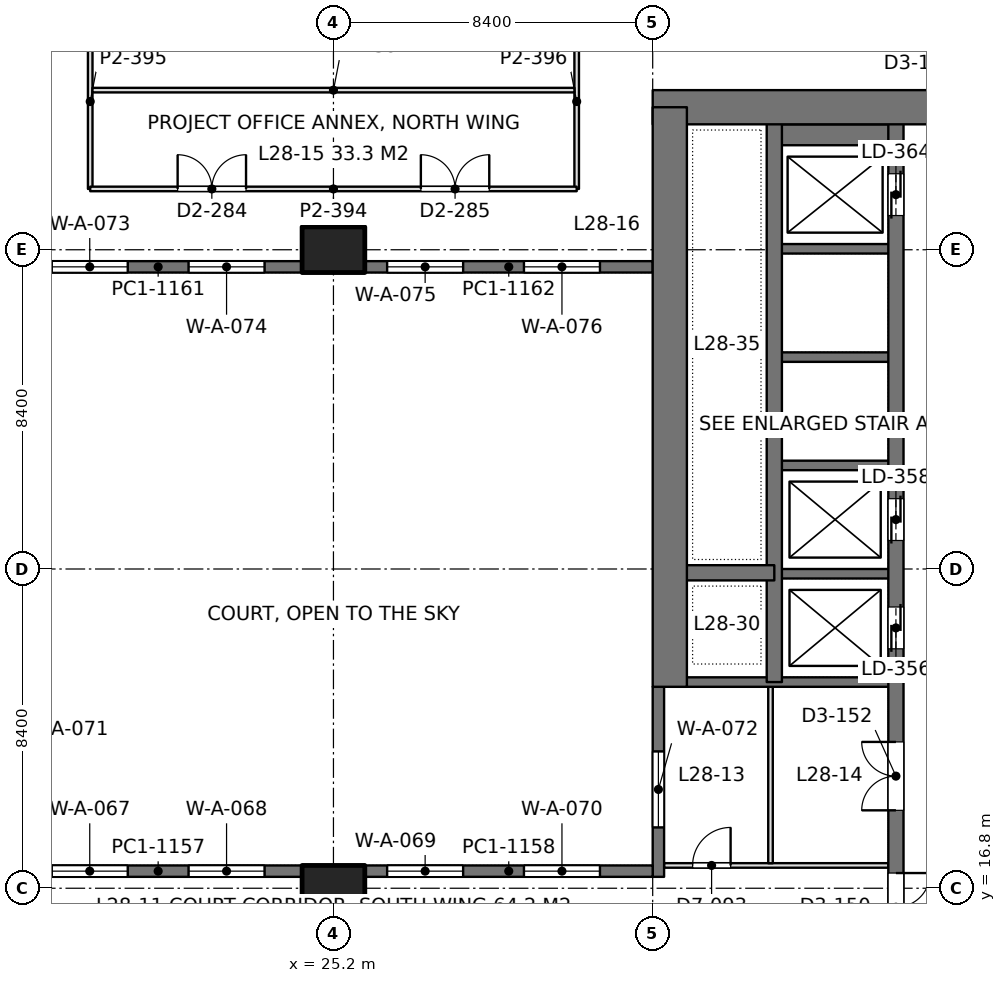
"""IFC4 building model, lengths in metres.
Left out: names, types, materials, properties, quantities, classifications, styles, units other than length and angle.
Written with IfcOpenShell. Run it as: python <this file> out.ifc"""

import sys

from ifc_helpers import new_model, si_unit, direction, frame, frame_2d, origin, origin_2d, place, context, subcontext, project, spatial, rectangle, extrude, element, fill, save


model = new_model("IFC4")
c1 = context("Model", 3, precision=1e-05, world=origin(), true_north=direction((0.0, 1.0)))
c2 = subcontext(c1, "Body", "Model", "MODEL_VIEW")
j1 = project(units=[si_unit("LENGTHUNIT", "METRE"), si_unit("PLANEANGLEUNIT", "RADIAN")], contexts=[c1])
p1 = place(None, origin())
s1 = spatial("IfcSite", under=j1, at=p1, CompositionType="ELEMENT")
p2 = place(p1, origin())
s2 = spatial("IfcBuilding", under=s1, at=p2, CompositionType="ELEMENT")
p3 = place(p2, frame((0.0, 0.0, 126.0)))
s3 = spatial("IfcBuildingStorey", under=s2, at=p3, CompositionType="ELEMENT", Elevation=126.0)
for number, where, z_axis, x_axis in (
    (1, (25.2, 16.8, 0.0), (0.0, 0.0, 1.0), (1.0, 0.0, 0.0)),
    (2, (25.2, 33.6, 0.0), (0.0, 0.0, 1.0), (1.0, 0.0, 0.0)),
):
    element("IfcColumn", number, at=place(p3, frame(where, z_axis=z_axis, x_axis=x_axis)), inside=s3, PredefinedType="COLUMN", context=c2, shape_type="SweptSolid", body=[
        extrude(rectangle(XDim=1.65, YDim=1.2, at=origin_2d()), origin(), (0.0, 0.0, 1.0), 4.2),
    ])
p4 = place(p3, frame((33.6, 37.35, 0.0), z_axis=(0.0, 0.0, 1.0), x_axis=(1.0, 0.0, 0.0)))
e3 = element("IfcWall", 3, at=p4, inside=s3, PredefinedType="SHEAR", context=c2, shape_type="SweptSolid", body=[
    extrude(rectangle(XDim=18.0, YDim=0.9, at=frame_2d((9.0, 0.0))), origin(), (0.0, 0.0, 1.0), 4.2),
])
p5 = place(p4, frame((7.25, 0.0, 0.0)))
e4 = element("IfcOpeningElement", 4, at=p5, cuts=e3, PredefinedType="OPENING", context=c2, shape_type="SweptSolid", body=[
    extrude(rectangle(XDim=1.8, YDim=2.4, at=frame_2d((0.9, 1.2))), frame((0.0, 0.46, 0.0), z_axis=(0.0, -1.0, 0.0), x_axis=(1.0, 0.0, 0.0)), (0.0, 0.0, 1.0), 0.92),
])
p6 = place(p3, frame((34.05, 22.1, 0.0), z_axis=(0.0, 0.0, 1.0), x_axis=(0.0, 1.0, 0.0)))
e5 = element("IfcWall", 5, at=p6, inside=s3, PredefinedType="SHEAR", context=c2, shape_type="SweptSolid", body=[
    extrude(rectangle(XDim=15.25, YDim=0.9, at=frame_2d((7.625, 0.0))), origin(), (0.0, 0.0, 1.0), 4.2),
])
p7 = place(p3, frame((40.0, 13.05, 0.0), z_axis=(0.0, 0.0, 1.0), x_axis=(0.0, 1.0, 0.0)))
e6 = element("IfcWall", 6, at=p7, inside=s3, PredefinedType="SHEAR", context=c2, shape_type="SweptSolid", body=[
    extrude(rectangle(XDim=24.3, YDim=0.4, at=frame_2d((12.15, 0.0))), origin(), (0.0, 0.0, 1.0), 4.2),
])
p8 = place(p7, frame((10.05, 0.0, 0.0)))
e7 = element("IfcOpeningElement", 7, at=p8, cuts=e6, PredefinedType="OPENING", context=c2, shape_type="SweptSolid", body=[
    extrude(rectangle(XDim=1.1, YDim=2.2, at=frame_2d((0.55, 1.1))), frame((0.0, 0.21, 0.0), z_axis=(0.0, -1.0, 0.0), x_axis=(1.0, 0.0, 0.0)), (0.0, 0.0, 1.0), 0.42),
])
p9 = place(p7, frame((12.9, 0.0, 0.0)))
e8 = element("IfcOpeningElement", 8, at=p9, cuts=e6, PredefinedType="OPENING", context=c2, shape_type="SweptSolid", body=[
    extrude(rectangle(XDim=1.1, YDim=2.2, at=frame_2d((0.55, 1.1))), frame((0.0, 0.21, 0.0), z_axis=(0.0, -1.0, 0.0), x_axis=(1.0, 0.0, 0.0)), (0.0, 0.0, 1.0), 0.42),
])
p10 = place(p7, frame((21.45, 0.0, 0.0)))
e9 = element("IfcOpeningElement", 9, at=p10, cuts=e6, PredefinedType="OPENING", context=c2, shape_type="SweptSolid", body=[
    extrude(rectangle(XDim=1.1, YDim=2.2, at=frame_2d((0.55, 1.1))), frame((0.0, 0.21, 0.0), z_axis=(0.0, -1.0, 0.0), x_axis=(1.0, 0.0, 0.0)), (0.0, 0.0, 1.0), 0.42),
])
p11 = place(p7, frame((2.35, 0.0, 0.0)))
e10 = element("IfcOpeningElement", 10, at=p11, cuts=e6, PredefinedType="OPENING", context=c2, shape_type="SweptSolid", body=[
    extrude(rectangle(XDim=1.8, YDim=2.4, at=frame_2d((0.9, 1.2))), frame((0.0, 0.21, 0.0), z_axis=(0.0, -1.0, 0.0), x_axis=(1.0, 0.0, 0.0)), (0.0, 0.0, 1.0), 0.42),
])
p12 = place(p7, frame((5.8, 0.0, 0.0)))
e11 = element("IfcOpeningElement", 11, at=p12, cuts=e6, PredefinedType="OPENING", context=c2, shape_type="SweptSolid", body=[
    extrude(rectangle(XDim=1.8, YDim=2.4, at=frame_2d((0.9, 1.2))), frame((0.0, 0.21, 0.0), z_axis=(0.0, -1.0, 0.0), x_axis=(1.0, 0.0, 0.0)), (0.0, 0.0, 1.0), 0.42),
])
p13 = place(p3, frame((36.8, 22.225, 0.0), z_axis=(0.0, 0.0, 1.0), x_axis=(0.0, 1.0, 0.0)))
e12 = element("IfcWall", 12, at=p13, inside=s3, PredefinedType="SHEAR", context=c2, shape_type="SweptSolid", body=[
    extrude(rectangle(XDim=15.125, YDim=0.4, at=frame_2d((7.562, 0.0))), origin(), (0.0, 0.0, 1.0), 4.2),
])
p14 = place(p3, frame((36.8, 25.1, 0.0), z_axis=(0.0, 0.0, 1.0), x_axis=(-1.0, 0.0, 0.0)))
e13 = element("IfcWall", 13, at=p14, inside=s3, PredefinedType="SHEAR", context=c2, shape_type="SweptSolid", body=[
    extrude(rectangle(XDim=2.75, YDim=0.4, at=frame_2d((1.375, 0.0))), origin(), (0.0, 0.0, 1.0), 4.2),
])
p15 = place(p3, frame((40.0, 22.225, 0.0), z_axis=(0.0, 0.0, 1.0), x_axis=(-1.0, 0.0, 0.0)))
e14 = element("IfcWall", 14, at=p15, inside=s3, PredefinedType="SHEAR", context=c2, shape_type="SweptSolid", body=[
    extrude(rectangle(XDim=5.95, YDim=0.25, at=frame_2d((2.975, 0.0))), origin(), (0.0, 0.0, 1.0), 4.2),
])
for number, where, z_axis, x_axis in (
    (15, (40.0, 25.075, 0.0), (0.0, 0.0, 1.0), (-1.0, 0.0, 0.0)),
    (16, (40.0, 27.925, 0.0), (0.0, 0.0, 1.0), (-1.0, 0.0, 0.0)),
    (17, (40.0, 30.775, 0.0), (0.0, 0.0, 1.0), (-1.0, 0.0, 0.0)),
    (18, (40.0, 33.625, 0.0), (0.0, 0.0, 1.0), (-1.0, 0.0, 0.0)),
):
    element("IfcWall", number, at=place(p3, frame(where, z_axis=z_axis, x_axis=x_axis)), inside=s3, PredefinedType="SHEAR", context=c2, shape_type="SweptSolid", body=[
        extrude(rectangle(XDim=3.2, YDim=0.25, at=frame_2d((1.6, 0.0))), origin(), (0.0, 0.0, 1.0), 4.2),
    ])
p16 = place(p3, frame((40.0, 36.625, 0.0), z_axis=(0.0, 0.0, 1.0), x_axis=(-1.0, 0.0, 0.0)))
e19 = element("IfcWall", 19, at=p16, inside=s3, PredefinedType="SHEAR", context=c2, shape_type="SweptSolid", body=[
    extrude(rectangle(XDim=3.2, YDim=0.55, at=frame_2d((1.6, 0.0))), origin(), (0.0, 0.0, 1.0), 4.2),
])
p17 = place(p3, frame((33.75, 17.1, 0.0), z_axis=(0.0, 0.0, 1.0), x_axis=(0.0, 1.0, 0.0)))
e20 = element("IfcWall", 20, at=p17, inside=s3, PredefinedType="SOLIDWALL", context=c2, shape_type="SweptSolid", body=[
    extrude(rectangle(XDim=5.0, YDim=0.3, at=frame_2d((2.5, 0.0))), origin(), (0.0, 0.0, 1.0), 4.05),
])
p18 = place(p17, frame((1.3, 0.0, 0.1)))
e21 = element("IfcOpeningElement", 21, at=p18, cuts=e20, PredefinedType="OPENING", context=c2, shape_type="SweptSolid", body=[
    extrude(rectangle(XDim=2.0, YDim=3.0, at=frame_2d((1.0, 1.5))), frame((0.0, 0.16, 0.0), z_axis=(0.0, -1.0, 0.0), x_axis=(1.0, 0.0, 0.0)), (0.0, 0.0, 1.0), 0.32),
])
p19 = place(p3, frame((16.8, 17.25, 0.0), z_axis=(0.0, 0.0, 1.0), x_axis=(1.0, 0.0, 0.0)))
e22 = element("IfcWall", 22, at=p19, inside=s3, PredefinedType="SOLIDWALL", context=c2, shape_type="SweptSolid", body=[
    extrude(rectangle(XDim=7.575, YDim=0.3, at=frame_2d((3.788, 0.0))), origin(), (0.0, 0.0, 1.0), 4.05),
])
p20 = place(p19, frame((0.988, 0.0, 0.1)))
e23 = element("IfcOpeningElement", 23, at=p20, cuts=e22, PredefinedType="OPENING", context=c2, shape_type="SweptSolid", body=[
    extrude(rectangle(XDim=2.0, YDim=3.0, at=frame_2d((1.0, 1.5))), frame((0.0, 0.16, 0.0), z_axis=(0.0, -1.0, 0.0), x_axis=(1.0, 0.0, 0.0)), (0.0, 0.0, 1.0), 0.32),
])
p21 = place(p19, frame((4.587, 0.0, 0.1)))
e24 = element("IfcOpeningElement", 24, at=p21, cuts=e22, PredefinedType="OPENING", context=c2, shape_type="SweptSolid", body=[
    extrude(rectangle(XDim=2.0, YDim=3.0, at=frame_2d((1.0, 1.5))), frame((0.0, 0.16, 0.0), z_axis=(0.0, -1.0, 0.0), x_axis=(1.0, 0.0, 0.0)), (0.0, 0.0, 1.0), 0.32),
])
p22 = place(p3, frame((26.025, 17.25, 0.0), z_axis=(0.0, 0.0, 1.0), x_axis=(1.0, 0.0, 0.0)))
e25 = element("IfcWall", 25, at=p22, inside=s3, PredefinedType="SOLIDWALL", context=c2, shape_type="SweptSolid", body=[
    extrude(rectangle(XDim=7.575, YDim=0.3, at=frame_2d((3.788, 0.0))), origin(), (0.0, 0.0, 1.0), 4.05),
])
p23 = place(p22, frame((0.587, 0.0, 0.1)))
e26 = element("IfcOpeningElement", 26, at=p23, cuts=e25, PredefinedType="OPENING", context=c2, shape_type="SweptSolid", body=[
    extrude(rectangle(XDim=2.0, YDim=3.0, at=frame_2d((1.0, 1.5))), frame((0.0, 0.16, 0.0), z_axis=(0.0, -1.0, 0.0), x_axis=(1.0, 0.0, 0.0)), (0.0, 0.0, 1.0), 0.32),
])
p24 = place(p22, frame((4.188, 0.0, 0.1)))
e27 = element("IfcOpeningElement", 27, at=p24, cuts=e25, PredefinedType="OPENING", context=c2, shape_type="SweptSolid", body=[
    extrude(rectangle(XDim=2.0, YDim=3.0, at=frame_2d((1.0, 1.5))), frame((0.0, 0.16, 0.0), z_axis=(0.0, -1.0, 0.0), x_axis=(1.0, 0.0, 0.0)), (0.0, 0.0, 1.0), 0.32),
])
p25 = place(p3, frame((16.8, 33.15, 0.0), z_axis=(0.0, 0.0, 1.0), x_axis=(1.0, 0.0, 0.0)))
e28 = element("IfcWall", 28, at=p25, inside=s3, PredefinedType="SOLIDWALL", context=c2, shape_type="SweptSolid", body=[
    extrude(rectangle(XDim=7.575, YDim=0.3, at=frame_2d((3.788, 0.0))), origin(), (0.0, 0.0, 1.0), 4.05),
])
p26 = place(p25, frame((0.988, 0.0, 0.1)))
e29 = element("IfcOpeningElement", 29, at=p26, cuts=e28, PredefinedType="OPENING", context=c2, shape_type="SweptSolid", body=[
    extrude(rectangle(XDim=2.0, YDim=3.0, at=frame_2d((1.0, 1.5))), frame((0.0, 0.16, 0.0), z_axis=(0.0, -1.0, 0.0), x_axis=(1.0, 0.0, 0.0)), (0.0, 0.0, 1.0), 0.32),
])
p27 = place(p25, frame((4.587, 0.0, 0.1)))
e30 = element("IfcOpeningElement", 30, at=p27, cuts=e28, PredefinedType="OPENING", context=c2, shape_type="SweptSolid", body=[
    extrude(rectangle(XDim=2.0, YDim=3.0, at=frame_2d((1.0, 1.5))), frame((0.0, 0.16, 0.0), z_axis=(0.0, -1.0, 0.0), x_axis=(1.0, 0.0, 0.0)), (0.0, 0.0, 1.0), 0.32),
])
p28 = place(p3, frame((26.025, 33.15, 0.0), z_axis=(0.0, 0.0, 1.0), x_axis=(1.0, 0.0, 0.0)))
e31 = element("IfcWall", 31, at=p28, inside=s3, PredefinedType="SOLIDWALL", context=c2, shape_type="SweptSolid", body=[
    extrude(rectangle(XDim=7.575, YDim=0.3, at=frame_2d((3.788, 0.0))), origin(), (0.0, 0.0, 1.0), 4.05),
])
p29 = place(p28, frame((0.587, 0.0, 0.1)))
e32 = element("IfcOpeningElement", 32, at=p29, cuts=e31, PredefinedType="OPENING", context=c2, shape_type="SweptSolid", body=[
    extrude(rectangle(XDim=2.0, YDim=3.0, at=frame_2d((1.0, 1.5))), frame((0.0, 0.16, 0.0), z_axis=(0.0, -1.0, 0.0), x_axis=(1.0, 0.0, 0.0)), (0.0, 0.0, 1.0), 0.32),
])
p30 = place(p28, frame((4.188, 0.0, 0.1)))
e33 = element("IfcOpeningElement", 33, at=p30, cuts=e31, PredefinedType="OPENING", context=c2, shape_type="SweptSolid", body=[
    extrude(rectangle(XDim=2.0, YDim=3.0, at=frame_2d((1.0, 1.5))), frame((0.0, 0.16, 0.0), z_axis=(0.0, -1.0, 0.0), x_axis=(1.0, 0.0, 0.0)), (0.0, 0.0, 1.0), 0.32),
])
p31 = place(p3, frame((33.898, 17.4, 0.0), z_axis=(0.0, 0.0, 1.0), x_axis=(1.0, 0.0, 0.0)))
e34 = element("IfcWall", 34, at=p31, inside=s3, PredefinedType="PARTITIONING", context=c2, shape_type="SweptSolid", body=[
    extrude(rectangle(XDim=5.904, YDim=0.12, at=frame_2d((2.952, 0.0))), origin(), (0.0, 0.0, 1.0), 3.55),
])
p32 = place(p31, frame((0.752, 0.0, 0.0)))
e35 = element("IfcOpeningElement", 35, at=p32, cuts=e34, PredefinedType="OPENING", context=c2, shape_type="SweptSolid", body=[
    extrude(rectangle(XDim=1.0, YDim=2.4, at=frame_2d((0.5, 1.2))), frame((0.0, 0.07, 0.0), z_axis=(0.0, -1.0, 0.0), x_axis=(1.0, 0.0, 0.0)), (0.0, 0.0, 1.0), 0.14),
])
p33 = place(p3, frame((36.7, 17.458, 0.0), z_axis=(0.0, 0.0, 1.0), x_axis=(0.0, 1.0, 0.0)))
e36 = element("IfcWall", 36, at=p33, inside=s3, PredefinedType="PARTITIONING", context=c2, shape_type="SweptSolid", body=[
    extrude(rectangle(XDim=4.644, YDim=0.12, at=frame_2d((2.322, 0.0))), origin(), (0.0, 0.0, 1.0), 3.6),
])
for number, where, z_axis, x_axis in (
    (37, (18.8, 35.2, 0.0), (0.0, 0.0, 1.0), (0.0, 1.0, 0.0)),
    (38, (31.6, 35.2, 0.0), (0.0, 0.0, 1.0), (0.0, 1.0, 0.0)),
):
    element("IfcWall", number, at=place(p3, frame(where, z_axis=z_axis, x_axis=x_axis)), inside=s3, PredefinedType="PARTITIONING", context=c2, shape_type="SweptSolid", body=[
        extrude(rectangle(XDim=4.6, YDim=0.12, at=frame_2d((2.3, 0.0))), origin(), (0.0, 0.0, 1.0), 4.05),
    ])
p34 = place(p3, frame((18.8, 35.2, 0.0), z_axis=(0.0, 0.0, 1.0), x_axis=(1.0, 0.0, 0.0)))
e39 = element("IfcWall", 39, at=p34, inside=s3, PredefinedType="PARTITIONING", context=c2, shape_type="SweptSolid", body=[
    extrude(rectangle(XDim=12.8, YDim=0.12, at=frame_2d((6.4, 0.0))), origin(), (0.0, 0.0, 1.0), 3.55),
])
p35 = place(p34, frame((2.3, 0.0, 0.0)))
e40 = element("IfcOpeningElement", 40, at=p35, cuts=e39, PredefinedType="OPENING", context=c2, shape_type="SweptSolid", body=[
    extrude(rectangle(XDim=1.8, YDim=2.2, at=frame_2d((0.9, 1.1))), frame((0.0, 0.07, 0.0), z_axis=(0.0, -1.0, 0.0), x_axis=(1.0, 0.0, 0.0)), (0.0, 0.0, 1.0), 0.14),
])
p36 = place(p34, frame((8.7, 0.0, 0.0)))
e41 = element("IfcOpeningElement", 41, at=p36, cuts=e39, PredefinedType="OPENING", context=c2, shape_type="SweptSolid", body=[
    extrude(rectangle(XDim=1.8, YDim=2.2, at=frame_2d((0.9, 1.1))), frame((0.0, 0.07, 0.0), z_axis=(0.0, -1.0, 0.0), x_axis=(1.0, 0.0, 0.0)), (0.0, 0.0, 1.0), 0.14),
])
p37 = place(p3, frame((18.858, 37.8, 0.0), z_axis=(0.0, 0.0, 1.0), x_axis=(1.0, 0.0, 0.0)))
e42 = element("IfcWall", 42, at=p37, inside=s3, PredefinedType="PARTITIONING", context=c2, shape_type="SweptSolid", body=[
    extrude(rectangle(XDim=12.684, YDim=0.12, at=frame_2d((6.342, 0.0))), origin(), (0.0, 0.0, 1.0), 3.55),
])
p38 = place(p18, origin())
e43 = element("IfcWindow", 43, at=p38, inside=s3, PartitioningType="SINGLE_PANEL", PredefinedType="WINDOW", context=c2, shape_type="SweptSolid", body=[
    extrude(rectangle(XDim=2.0, YDim=3.0, at=frame_2d((1.0, 1.5))), frame((0.0, 0.03, 0.0), z_axis=(0.0, -1.0, 0.0), x_axis=(1.0, 0.0, 0.0)), (0.0, 0.0, 1.0), 0.06),
])
fill(e21, e43)
p39 = place(p20, origin())
e44 = element("IfcWindow", 44, at=p39, inside=s3, PartitioningType="SINGLE_PANEL", PredefinedType="WINDOW", context=c2, shape_type="SweptSolid", body=[
    extrude(rectangle(XDim=2.0, YDim=3.0, at=frame_2d((1.0, 1.5))), frame((0.0, 0.03, 0.0), z_axis=(0.0, -1.0, 0.0), x_axis=(1.0, 0.0, 0.0)), (0.0, 0.0, 1.0), 0.06),
])
fill(e23, e44)
p40 = place(p21, origin())
e45 = element("IfcWindow", 45, at=p40, inside=s3, PartitioningType="SINGLE_PANEL", PredefinedType="WINDOW", context=c2, shape_type="SweptSolid", body=[
    extrude(rectangle(XDim=2.0, YDim=3.0, at=frame_2d((1.0, 1.5))), frame((0.0, 0.03, 0.0), z_axis=(0.0, -1.0, 0.0), x_axis=(1.0, 0.0, 0.0)), (0.0, 0.0, 1.0), 0.06),
])
fill(e24, e45)
p41 = place(p23, origin())
e46 = element("IfcWindow", 46, at=p41, inside=s3, PartitioningType="SINGLE_PANEL", PredefinedType="WINDOW", context=c2, shape_type="SweptSolid", body=[
    extrude(rectangle(XDim=2.0, YDim=3.0, at=frame_2d((1.0, 1.5))), frame((0.0, 0.03, 0.0), z_axis=(0.0, -1.0, 0.0), x_axis=(1.0, 0.0, 0.0)), (0.0, 0.0, 1.0), 0.06),
])
fill(e26, e46)
p42 = place(p24, origin())
e47 = element("IfcWindow", 47, at=p42, inside=s3, PartitioningType="SINGLE_PANEL", PredefinedType="WINDOW", context=c2, shape_type="SweptSolid", body=[
    extrude(rectangle(XDim=2.0, YDim=3.0, at=frame_2d((1.0, 1.5))), frame((0.0, 0.03, 0.0), z_axis=(0.0, -1.0, 0.0), x_axis=(1.0, 0.0, 0.0)), (0.0, 0.0, 1.0), 0.06),
])
fill(e27, e47)
p43 = place(p26, origin())
e48 = element("IfcWindow", 48, at=p43, inside=s3, PartitioningType="SINGLE_PANEL", PredefinedType="WINDOW", context=c2, shape_type="SweptSolid", body=[
    extrude(rectangle(XDim=2.0, YDim=3.0, at=frame_2d((1.0, 1.5))), frame((0.0, 0.03, 0.0), z_axis=(0.0, -1.0, 0.0), x_axis=(1.0, 0.0, 0.0)), (0.0, 0.0, 1.0), 0.06),
])
fill(e29, e48)
p44 = place(p27, origin())
e49 = element("IfcWindow", 49, at=p44, inside=s3, PartitioningType="SINGLE_PANEL", PredefinedType="WINDOW", context=c2, shape_type="SweptSolid", body=[
    extrude(rectangle(XDim=2.0, YDim=3.0, at=frame_2d((1.0, 1.5))), frame((0.0, 0.03, 0.0), z_axis=(0.0, -1.0, 0.0), x_axis=(1.0, 0.0, 0.0)), (0.0, 0.0, 1.0), 0.06),
])
fill(e30, e49)
p45 = place(p29, origin())
e50 = element("IfcWindow", 50, at=p45, inside=s3, PartitioningType="SINGLE_PANEL", PredefinedType="WINDOW", context=c2, shape_type="SweptSolid", body=[
    extrude(rectangle(XDim=2.0, YDim=3.0, at=frame_2d((1.0, 1.5))), frame((0.0, 0.03, 0.0), z_axis=(0.0, -1.0, 0.0), x_axis=(1.0, 0.0, 0.0)), (0.0, 0.0, 1.0), 0.06),
])
fill(e32, e50)
p46 = place(p30, origin())
e51 = element("IfcWindow", 51, at=p46, inside=s3, PartitioningType="SINGLE_PANEL", PredefinedType="WINDOW", context=c2, shape_type="SweptSolid", body=[
    extrude(rectangle(XDim=2.0, YDim=3.0, at=frame_2d((1.0, 1.5))), frame((0.0, 0.03, 0.0), z_axis=(0.0, -1.0, 0.0), x_axis=(1.0, 0.0, 0.0)), (0.0, 0.0, 1.0), 0.06),
])
fill(e33, e51)
p47 = place(p8, origin())
e52 = element("IfcDoor", 52, at=p47, inside=s3, OperationType="DOUBLE_DOOR_SLIDING", PredefinedType="DOOR", context=c2, shape_type="SweptSolid", body=[
    extrude(rectangle(XDim=1.1, YDim=2.2, at=frame_2d((0.55, 1.1))), frame((0.0, 0.025, 0.0), z_axis=(0.0, -1.0, 0.0), x_axis=(1.0, 0.0, 0.0)), (0.0, 0.0, 1.0), 0.05),
])
fill(e7, e52)
p48 = place(p9, origin())
e53 = element("IfcDoor", 53, at=p48, inside=s3, OperationType="DOUBLE_DOOR_SLIDING", PredefinedType="DOOR", context=c2, shape_type="SweptSolid", body=[
    extrude(rectangle(XDim=1.1, YDim=2.2, at=frame_2d((0.55, 1.1))), frame((0.0, 0.025, 0.0), z_axis=(0.0, -1.0, 0.0), x_axis=(1.0, 0.0, 0.0)), (0.0, 0.0, 1.0), 0.05),
])
fill(e8, e53)
p49 = place(p10, origin())
e54 = element("IfcDoor", 54, at=p49, inside=s3, OperationType="DOUBLE_DOOR_SLIDING", PredefinedType="DOOR", context=c2, shape_type="SweptSolid", body=[
    extrude(rectangle(XDim=1.1, YDim=2.2, at=frame_2d((0.55, 1.1))), frame((0.0, 0.025, 0.0), z_axis=(0.0, -1.0, 0.0), x_axis=(1.0, 0.0, 0.0)), (0.0, 0.0, 1.0), 0.05),
])
fill(e9, e54)
p50 = place(p11, frame((1.8, 0.0, 0.0), z_axis=(0.0, 0.0, 1.0), x_axis=(-1.0, 0.0, 0.0)))
e55 = element("IfcDoor", 55, at=p50, inside=s3, OperationType="DOUBLE_DOOR_SINGLE_SWING", PredefinedType="DOOR", context=c2, shape_type="SweptSolid", body=[
    extrude(rectangle(XDim=1.8, YDim=2.4, at=frame_2d((0.9, 1.2))), frame((0.0, 0.025, 0.0), z_axis=(0.0, -1.0, 0.0), x_axis=(1.0, 0.0, 0.0)), (0.0, 0.0, 1.0), 0.05),
])
fill(e10, e55)
p51 = place(p12, origin())
e56 = element("IfcDoor", 56, at=p51, inside=s3, OperationType="DOUBLE_DOOR_SINGLE_SWING", PredefinedType="DOOR", context=c2, shape_type="SweptSolid", body=[
    extrude(rectangle(XDim=1.8, YDim=2.4, at=frame_2d((0.9, 1.2))), frame((0.0, 0.025, 0.0), z_axis=(0.0, -1.0, 0.0), x_axis=(1.0, 0.0, 0.0)), (0.0, 0.0, 1.0), 0.05),
])
fill(e11, e56)
p52 = place(p32, origin())
e57 = element("IfcDoor", 57, at=p52, inside=s3, OperationType="SINGLE_SWING_RIGHT", PredefinedType="DOOR", context=c2, shape_type="SweptSolid", body=[
    extrude(rectangle(XDim=1.0, YDim=2.4, at=frame_2d((0.5, 1.2))), frame((0.0, 0.025, 0.0), z_axis=(0.0, -1.0, 0.0), x_axis=(1.0, 0.0, 0.0)), (0.0, 0.0, 1.0), 0.05),
])
fill(e35, e57)
p53 = place(p35, origin())
e58 = element("IfcDoor", 58, at=p53, inside=s3, OperationType="DOUBLE_DOOR_SINGLE_SWING", PredefinedType="DOOR", context=c2, shape_type="SweptSolid", body=[
    extrude(rectangle(XDim=1.8, YDim=2.2, at=frame_2d((0.9, 1.1))), frame((0.0, 0.025, 0.0), z_axis=(0.0, -1.0, 0.0), x_axis=(1.0, 0.0, 0.0)), (0.0, 0.0, 1.0), 0.05),
])
fill(e40, e58)
p54 = place(p36, origin())
e59 = element("IfcDoor", 59, at=p54, inside=s3, OperationType="DOUBLE_DOOR_SINGLE_SWING", PredefinedType="DOOR", context=c2, shape_type="SweptSolid", body=[
    extrude(rectangle(XDim=1.8, YDim=2.2, at=frame_2d((0.9, 1.1))), frame((0.0, 0.025, 0.0), z_axis=(0.0, -1.0, 0.0), x_axis=(1.0, 0.0, 0.0)), (0.0, 0.0, 1.0), 0.05),
])
fill(e41, e59)
save(model, sys.argv[1])
